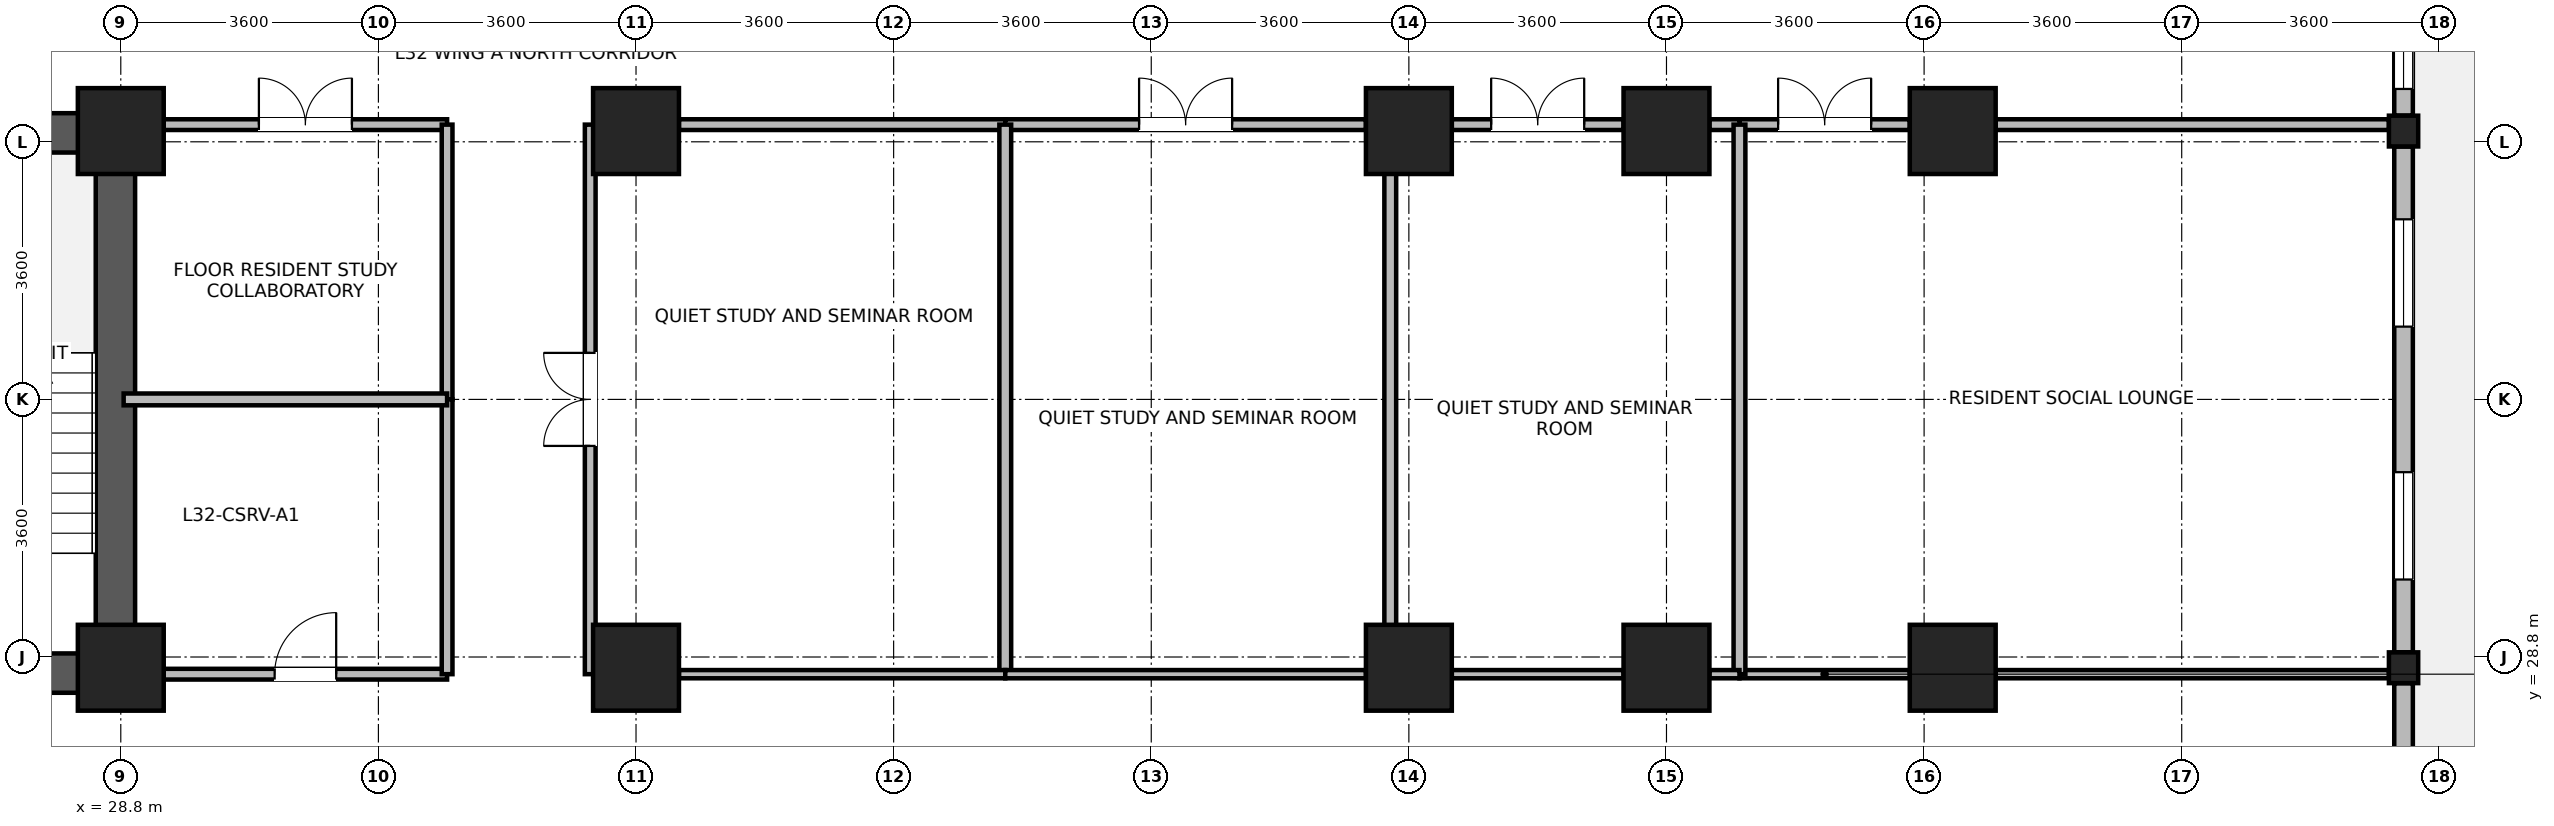
"""IFC4 building model, lengths in metres.
Left out: names, types, materials, properties, quantities, classifications, styles, units other than length and angle.
Written with IfcOpenShell. Run it as: python <this file> out.ifc"""

import sys

from ifc_helpers import new_model, si_unit, direction, frame, frame_2d, origin, origin_2d, place, context, subcontext, project, spatial, rectangle, i_section, extrude, source, transform, mapped, element, fill, save


model = new_model("IFC4")
c1 = context("Model", 3, precision=1e-05, world=origin(), true_north=direction((0.0, 1.0)))
c2 = subcontext(c1, "Body", "Model", "MODEL_VIEW")
j1 = project(units=[si_unit("LENGTHUNIT", "METRE"), si_unit("PLANEANGLEUNIT", "RADIAN")], contexts=[c1])
p1 = place(None, origin())
s1 = spatial("IfcSite", under=j1, at=p1, CompositionType="ELEMENT")
p2 = place(p1, origin())
s2 = spatial("IfcBuilding", under=s1, at=p2, CompositionType="ELEMENT")
p3 = place(p2, frame((0.0, 0.0, 126.7)))
s3 = spatial("IfcBuildingStorey", under=s2, at=p3, CompositionType="ELEMENT", Elevation=126.7)
p4 = place(p3, frame((28.725, 28.3, 0.0), z_axis=(0.0, 0.0, 1.0), x_axis=(0.0, 1.0, 0.0)))
e1 = element("IfcWall", 1, at=p4, inside=s3, PredefinedType="SHEAR", context=c2, shape_type="SweptSolid", body=[
    extrude(rectangle(XDim=8.1, YDim=0.55, at=frame_2d((4.05, 0.0))), origin(), (0.0, 0.0, 1.0), 3.34),
])
for number, where, z_axis, x_axis in (
    (2, (25.25, 28.575, 0.0), (0.0, 0.0, 1.0), (1.0, 0.0, 0.0)),
    (3, (25.25, 36.125, 0.0), (0.0, 0.0, 1.0), (1.0, 0.0, 0.0)),
):
    element("IfcWall", number, at=place(p3, frame(where, z_axis=z_axis, x_axis=x_axis)), inside=s3, PredefinedType="SHEAR", context=c2, shape_type="SweptSolid", body=[
        extrude(rectangle(XDim=3.2, YDim=0.55, at=frame_2d((1.6, 0.0))), origin(), (0.0, 0.0, 1.0), 3.34),
    ])
m1 = source(origin(), c2, "Body", "SweptSolid", [
    extrude(rectangle(XDim=1.2, YDim=1.2, at=origin_2d()), origin(), (0.0, 0.0, 1.0), 3.7),
])
for number, where, z_axis, x_axis in (
    (4, (28.8, 28.65, 0.0), (0.0, 0.0, 1.0), (1.0, 0.0, 0.0)),
    (5, (28.8, 36.15, 0.0), (0.0, 0.0, 1.0), (1.0, 0.0, 0.0)),
    (6, (36.0, 28.65, 0.0), (0.0, 0.0, 1.0), (1.0, 0.0, 0.0)),
    (7, (36.0, 36.15, 0.0), (0.0, 0.0, 1.0), (1.0, 0.0, 0.0)),
    (8, (46.8, 28.65, 0.0), (0.0, 0.0, 1.0), (1.0, 0.0, 0.0)),
    (9, (46.8, 36.15, 0.0), (0.0, 0.0, 1.0), (1.0, 0.0, 0.0)),
    (10, (50.4, 28.65, 0.0), (0.0, 0.0, 1.0), (1.0, 0.0, 0.0)),
    (11, (50.4, 36.15, 0.0), (0.0, 0.0, 1.0), (1.0, 0.0, 0.0)),
    (12, (54.4, 28.65, 0.0), (0.0, 0.0, 1.0), (1.0, 0.0, 0.0)),
    (13, (54.4, 36.15, 0.0), (0.0, 0.0, 1.0), (1.0, 0.0, 0.0)),
):
    element("IfcColumn", number, at=place(p3, frame(where, z_axis=z_axis, x_axis=x_axis)), inside=s3, PredefinedType="COLUMN", context=c2, shape_type="MappedRepresentation", body=[
        mapped(m1, transform((0.0, 0.0, 0.0), x_axis=(1.0, 0.0, 0.0), y_axis=(0.0, 1.0, 0.0), z_axis=(0.0, 0.0, 1.0), scale=1.0)),
    ])
m2 = source(origin(), c2, "Body", "SweptSolid", [
    extrude(i_section(OverallWidth=0.409, OverallDepth=0.43, WebThickness=0.024, FlangeThickness=0.033, FilletRadius=0.015, at=origin_2d()), origin(), (0.0, 0.0, 1.0), 3.7),
])
for number, where, z_axis, x_axis in (
    (14, (60.7, 28.65, 0.0), (0.0, 0.0, 1.0), (1.0, 0.0, 0.0)),
    (15, (60.7, 36.15, 0.0), (0.0, 0.0, 1.0), (1.0, 0.0, 0.0)),
):
    element("IfcColumn", number, at=place(p3, frame(where, z_axis=z_axis, x_axis=x_axis)), inside=s3, PredefinedType="COLUMN", context=c2, shape_type="MappedRepresentation", body=[
        mapped(m2, transform((0.0, 0.0, 0.0), x_axis=(1.0, 0.0, 0.0), y_axis=(0.0, 1.0, 0.0), z_axis=(0.0, 0.0, 1.0), scale=1.0)),
    ])
p5 = place(p3, frame((60.7, 28.434, 0.0), z_axis=(0.0, 0.0, 1.0), x_axis=(0.0, -1.0, 0.0)))
e16 = element("IfcWall", 16, at=p5, inside=s3, PredefinedType="STANDARD", context=c2, shape_type="SweptSolid", body=[
    extrude(rectangle(XDim=6.618, YDim=0.26, at=frame_2d((3.309, 0.0))), origin(), (0.0, 0.0, 1.0), 2.87),
])
p6 = place(p5, frame((4.213, 0.0, 0.85)))
e17 = element("IfcOpeningElement", 17, at=p6, cuts=e16, PredefinedType="OPENING", context=c2, shape_type="SweptSolid", body=[
    extrude(rectangle(XDim=1.5, YDim=1.85, at=frame_2d((0.75, 0.925))), frame((0.0, 0.14, 0.0), z_axis=(0.0, -1.0, 0.0), x_axis=(1.0, 0.0, 0.0)), (0.0, 0.0, 1.0), 0.28),
])
p7 = place(p5, frame((2.834, 0.0, 0.85)))
e18 = element("IfcOpeningElement", 18, at=p7, cuts=e16, PredefinedType="OPENING", context=c2, shape_type="SweptSolid", body=[
    extrude(rectangle(XDim=0.95, YDim=1.75, at=frame_2d((0.475, 0.875))), frame((0.0, 0.14, 0.0), z_axis=(0.0, -1.0, 0.0), x_axis=(1.0, 0.0, 0.0)), (0.0, 0.0, 1.0), 0.28),
])
p8 = place(p3, frame((60.7, 35.934, 0.0), z_axis=(0.0, 0.0, 1.0), x_axis=(0.0, -1.0, 0.0)))
e19 = element("IfcWall", 19, at=p8, inside=s3, PredefinedType="STANDARD", context=c2, shape_type="SweptSolid", body=[
    extrude(rectangle(XDim=7.068, YDim=0.26, at=frame_2d((3.534, 0.0))), origin(), (0.0, 0.0, 1.0), 2.87),
])
p9 = place(p8, frame((1.017, 0.0, 0.85)))
e20 = element("IfcOpeningElement", 20, at=p9, cuts=e19, PredefinedType="OPENING", context=c2, shape_type="SweptSolid", body=[
    extrude(rectangle(XDim=1.5, YDim=1.85, at=frame_2d((0.75, 0.925))), frame((0.0, 0.14, 0.0), z_axis=(0.0, -1.0, 0.0), x_axis=(1.0, 0.0, 0.0)), (0.0, 0.0, 1.0), 0.28),
])
p10 = place(p8, frame((4.551, 0.0, 0.85)))
e21 = element("IfcOpeningElement", 21, at=p10, cuts=e19, PredefinedType="OPENING", context=c2, shape_type="SweptSolid", body=[
    extrude(rectangle(XDim=1.5, YDim=1.85, at=frame_2d((0.75, 0.925))), frame((0.0, 0.14, 0.0), z_axis=(0.0, -1.0, 0.0), x_axis=(1.0, 0.0, 0.0)), (0.0, 0.0, 1.0), 0.28),
])
p11 = place(p3, frame((60.7, 39.73, 0.0), z_axis=(0.0, 0.0, 1.0), x_axis=(0.0, -1.0, 0.0)))
e22 = element("IfcWall", 22, at=p11, inside=s3, PredefinedType="STANDARD", context=c2, shape_type="SweptSolid", body=[
    extrude(rectangle(XDim=3.364, YDim=0.26, at=frame_2d((1.682, 0.0))), origin(), (0.0, 0.0, 1.0), 3.32),
])
p12 = place(p11, frame((2.041, 0.0, 0.85)))
e23 = element("IfcOpeningElement", 23, at=p12, cuts=e22, PredefinedType="OPENING", context=c2, shape_type="SweptSolid", body=[
    extrude(rectangle(XDim=0.95, YDim=1.75, at=frame_2d((0.475, 0.875))), frame((0.0, 0.14, 0.0), z_axis=(0.0, -1.0, 0.0), x_axis=(1.0, 0.0, 0.0)), (0.0, 0.0, 1.0), 0.28),
])
p13 = place(p11, frame((0.265, 0.0, 0.85)))
e24 = element("IfcOpeningElement", 24, at=p13, cuts=e22, PredefinedType="OPENING", context=c2, shape_type="SweptSolid", body=[
    extrude(rectangle(XDim=0.95, YDim=1.75, at=frame_2d((0.475, 0.875))), frame((0.0, 0.14, 0.0), z_axis=(0.0, -1.0, 0.0), x_axis=(1.0, 0.0, 0.0)), (0.0, 0.0, 1.0), 0.28),
])
p14 = place(p3, frame((51.42, 36.24, 0.0), z_axis=(0.0, 0.0, 1.0), x_axis=(1.0, 0.0, 0.0)))
e25 = element("IfcWall", 25, at=p14, inside=s3, PredefinedType="PARTITIONING", context=c2, shape_type="SweptSolid", body=[
    extrude(rectangle(XDim=2.38, YDim=0.15, at=frame_2d((1.19, 0.0))), origin(), (0.0, 0.0, 1.0), 2.67),
])
p15 = place(p14, frame((0.54, 0.0, 0.0)))
e26 = element("IfcOpeningElement", 26, at=p15, cuts=e25, PredefinedType="OPENING", context=c2, shape_type="SweptSolid", body=[
    extrude(rectangle(XDim=1.3, YDim=2.12, at=frame_2d((0.65, 1.06))), frame((0.0, 0.085, 0.0), z_axis=(0.0, -1.0, 0.0), x_axis=(1.0, 0.0, 0.0)), (0.0, 0.0, 1.0), 0.17),
])
p16 = place(p3, frame((55.0, 36.24, 0.0), z_axis=(0.0, 0.0, 1.0), x_axis=(1.0, 0.0, 0.0)))
e27 = element("IfcWall", 27, at=p16, inside=s3, PredefinedType="PARTITIONING", context=c2, shape_type="SweptSolid", body=[
    extrude(rectangle(XDim=5.496, YDim=0.15, at=frame_2d((2.748, 0.0))), origin(), (0.0, 0.0, 1.0), 2.67),
])
p17 = place(p3, frame((35.36, 28.56, 0.0), z_axis=(0.0, 0.0, 1.0), x_axis=(0.0, 1.0, 0.0)))
e28 = element("IfcWall", 28, at=p17, inside=s3, PredefinedType="PARTITIONING", context=c2, shape_type="SweptSolid", body=[
    extrude(rectangle(XDim=7.68, YDim=0.15, at=frame_2d((3.84, 0.0))), origin(), (0.0, 0.0, 1.0), 3.32),
])
p18 = place(p17, frame((3.19, 0.0, 0.0)))
e29 = element("IfcOpeningElement", 29, at=p18, cuts=e28, PredefinedType="OPENING", context=c2, shape_type="SweptSolid", body=[
    extrude(rectangle(XDim=1.3, YDim=2.12, at=frame_2d((0.65, 1.06))), frame((0.0, 0.085, 0.0), z_axis=(0.0, -1.0, 0.0), x_axis=(1.0, 0.0, 0.0)), (0.0, 0.0, 1.0), 0.17),
])
p19 = place(p3, frame((36.6, 36.24, 0.0), z_axis=(0.0, 0.0, 1.0), x_axis=(1.0, 0.0, 0.0)))
e30 = element("IfcWall", 30, at=p19, inside=s3, PredefinedType="PARTITIONING", context=c2, shape_type="SweptSolid", body=[
    extrude(rectangle(XDim=4.56, YDim=0.15, at=frame_2d((2.28, 0.0))), origin(), (0.0, 0.0, 1.0), 2.67),
])
p20 = place(p3, frame((41.16, 36.24, 0.0), z_axis=(0.0, 0.0, 1.0), x_axis=(1.0, 0.0, 0.0)))
e31 = element("IfcWall", 31, at=p20, inside=s3, PredefinedType="PARTITIONING", context=c2, shape_type="SweptSolid", body=[
    extrude(rectangle(XDim=5.04, YDim=0.15, at=frame_2d((2.52, 0.0))), origin(), (0.0, 0.0, 1.0), 2.67),
])
p21 = place(p20, frame((1.87, 0.0, 0.0)))
e32 = element("IfcOpeningElement", 32, at=p21, cuts=e31, PredefinedType="OPENING", context=c2, shape_type="SweptSolid", body=[
    extrude(rectangle(XDim=1.3, YDim=2.12, at=frame_2d((0.65, 1.06))), frame((0.0, 0.085, 0.0), z_axis=(0.0, -1.0, 0.0), x_axis=(1.0, 0.0, 0.0)), (0.0, 0.0, 1.0), 0.17),
])
p22 = place(p3, frame((47.4, 36.24, 0.0), z_axis=(0.0, 0.0, 1.0), x_axis=(1.0, 0.0, 0.0)))
e33 = element("IfcWall", 33, at=p22, inside=s3, PredefinedType="PARTITIONING", context=c2, shape_type="SweptSolid", body=[
    extrude(rectangle(XDim=2.4, YDim=0.15, at=frame_2d((1.2, 0.0))), origin(), (0.0, 0.0, 1.0), 2.67),
])
p23 = place(p22, frame((0.55, 0.0, 0.0)))
e34 = element("IfcOpeningElement", 34, at=p23, cuts=e33, PredefinedType="OPENING", context=c2, shape_type="SweptSolid", body=[
    extrude(rectangle(XDim=1.3, YDim=2.12, at=frame_2d((0.65, 1.06))), frame((0.0, 0.085, 0.0), z_axis=(0.0, -1.0, 0.0), x_axis=(1.0, 0.0, 0.0)), (0.0, 0.0, 1.0), 0.17),
])
p24 = place(p3, frame((51.0, 36.24, 0.0), z_axis=(0.0, 0.0, 1.0), x_axis=(1.0, 0.0, 0.0)))
e35 = element("IfcWall", 35, at=p24, inside=s3, PredefinedType="PARTITIONING", context=c2, shape_type="SweptSolid", body=[
    extrude(rectangle(XDim=0.42, YDim=0.15, at=frame_2d((0.21, 0.0))), origin(), (0.0, 0.0, 1.0), 2.67),
])
p25 = place(p3, frame((29.4, 28.56, 0.0), z_axis=(0.0, 0.0, 1.0), x_axis=(1.0, 0.0, 0.0)))
e36 = element("IfcWall", 36, at=p25, inside=s3, PredefinedType="PARTITIONING", context=c2, shape_type="SweptSolid", body=[
    extrude(rectangle(XDim=3.96, YDim=0.15, at=frame_2d((1.98, 0.0))), origin(), (0.0, 0.0, 1.0), 2.67),
])
p26 = place(p25, frame((1.55, 0.0, 0.0)))
e37 = element("IfcOpeningElement", 37, at=p26, cuts=e36, PredefinedType="OPENING", context=c2, shape_type="SweptSolid", body=[
    extrude(rectangle(XDim=0.86, YDim=2.02, at=frame_2d((0.43, 1.01))), frame((0.0, 0.085, 0.0), z_axis=(0.0, -1.0, 0.0), x_axis=(1.0, 0.0, 0.0)), (0.0, 0.0, 1.0), 0.17),
])
p27 = place(p3, frame((29.4, 36.24, 0.0), z_axis=(0.0, 0.0, 1.0), x_axis=(1.0, 0.0, 0.0)))
e38 = element("IfcWall", 38, at=p27, inside=s3, PredefinedType="PARTITIONING", context=c2, shape_type="SweptSolid", body=[
    extrude(rectangle(XDim=3.96, YDim=0.15, at=frame_2d((1.98, 0.0))), origin(), (0.0, 0.0, 1.0), 2.67),
])
p28 = place(p27, frame((1.33, 0.0, 0.0)))
e39 = element("IfcOpeningElement", 39, at=p28, cuts=e38, PredefinedType="OPENING", context=c2, shape_type="SweptSolid", body=[
    extrude(rectangle(XDim=1.3, YDim=2.12, at=frame_2d((0.65, 1.06))), frame((0.0, 0.085, 0.0), z_axis=(0.0, -1.0, 0.0), x_axis=(1.0, 0.0, 0.0)), (0.0, 0.0, 1.0), 0.17),
])
p29 = place(p3, frame((33.36, 32.4, 0.0), z_axis=(0.0, 0.0, 1.0), x_axis=(0.0, 1.0, 0.0)))
e40 = element("IfcWall", 40, at=p29, inside=s3, PredefinedType="PARTITIONING", context=c2, shape_type="SweptSolid", body=[
    extrude(rectangle(XDim=3.84, YDim=0.15, at=frame_2d((1.92, 0.0))), origin(), (0.0, 0.0, 1.0), 3.32),
])
p30 = place(p3, frame((33.36, 28.56, 0.0), z_axis=(0.0, 0.0, 1.0), x_axis=(0.0, 1.0, 0.0)))
e41 = element("IfcWall", 41, at=p30, inside=s3, PredefinedType="PARTITIONING", context=c2, shape_type="SweptSolid", body=[
    extrude(rectangle(XDim=3.84, YDim=0.15, at=frame_2d((1.92, 0.0))), origin(), (0.0, 0.0, 1.0), 3.32),
])
p31 = place(p3, frame((51.42, 28.56, 0.0), z_axis=(0.0, 0.0, 1.0), x_axis=(1.0, 0.0, 0.0)))
e42 = element("IfcWall", 42, at=p31, inside=s3, PredefinedType="PARTITIONING", context=c2, shape_type="SweptSolid", body=[
    extrude(rectangle(XDim=2.38, YDim=0.115, at=frame_2d((1.19, 0.0))), origin(), (0.0, 0.0, 1.0), 2.67),
])
p32 = place(p3, frame((55.0, 28.56, 0.0), z_axis=(0.0, 0.0, 1.0), x_axis=(1.0, 0.0, 0.0)))
e43 = element("IfcWall", 43, at=p32, inside=s3, PredefinedType="PARTITIONING", context=c2, shape_type="SweptSolid", body=[
    extrude(rectangle(XDim=5.496, YDim=0.115, at=frame_2d((2.748, 0.0))), origin(), (0.0, 0.0, 1.0), 2.67),
])
for number, where, z_axis, x_axis in (
    (44, (41.16, 28.56, 0.0), (0.0, 0.0, 1.0), (0.0, 1.0, 0.0)),
    (45, (46.54, 28.56, 0.0), (0.0, 0.0, 1.0), (0.0, 1.0, 0.0)),
    (46, (51.42, 28.56, 0.0), (0.0, 0.0, 1.0), (0.0, 1.0, 0.0)),
):
    element("IfcWall", number, at=place(p3, frame(where, z_axis=z_axis, x_axis=x_axis)), inside=s3, PredefinedType="PARTITIONING", context=c2, shape_type="SweptSolid", body=[
        extrude(rectangle(XDim=7.68, YDim=0.165, at=frame_2d((3.84, 0.0))), origin(), (0.0, 0.0, 1.0), 3.32),
    ])
p33 = place(p3, frame((36.6, 28.56, 0.0), z_axis=(0.0, 0.0, 1.0), x_axis=(1.0, 0.0, 0.0)))
e47 = element("IfcWall", 47, at=p33, inside=s3, PredefinedType="PARTITIONING", context=c2, shape_type="SweptSolid", body=[
    extrude(rectangle(XDim=4.56, YDim=0.115, at=frame_2d((2.28, 0.0))), origin(), (0.0, 0.0, 1.0), 2.67),
])
p34 = place(p3, frame((41.16, 28.56, 0.0), z_axis=(0.0, 0.0, 1.0), x_axis=(1.0, 0.0, 0.0)))
e48 = element("IfcWall", 48, at=p34, inside=s3, PredefinedType="PARTITIONING", context=c2, shape_type="SweptSolid", body=[
    extrude(rectangle(XDim=5.04, YDim=0.115, at=frame_2d((2.52, 0.0))), origin(), (0.0, 0.0, 1.0), 2.67),
])
p35 = place(p3, frame((47.4, 28.56, 0.0), z_axis=(0.0, 0.0, 1.0), x_axis=(1.0, 0.0, 0.0)))
e49 = element("IfcWall", 49, at=p35, inside=s3, PredefinedType="PARTITIONING", context=c2, shape_type="SweptSolid", body=[
    extrude(rectangle(XDim=2.4, YDim=0.115, at=frame_2d((1.2, 0.0))), origin(), (0.0, 0.0, 1.0), 2.67),
])
p36 = place(p3, frame((51.0, 28.56, 0.0), z_axis=(0.0, 0.0, 1.0), x_axis=(1.0, 0.0, 0.0)))
e50 = element("IfcWall", 50, at=p36, inside=s3, PredefinedType="PARTITIONING", context=c2, shape_type="SweptSolid", body=[
    extrude(rectangle(XDim=0.42, YDim=0.115, at=frame_2d((0.21, 0.0))), origin(), (0.0, 0.0, 1.0), 2.67),
])
p37 = place(p3, frame((28.84, 32.4, 0.0), z_axis=(0.0, 0.0, 1.0), x_axis=(1.0, 0.0, 0.0)))
e51 = element("IfcWall", 51, at=p37, inside=s3, PredefinedType="PARTITIONING", context=c2, shape_type="SweptSolid", body=[
    extrude(rectangle(XDim=4.52, YDim=0.165, at=frame_2d((2.26, 0.0))), origin(), (0.0, 0.0, 1.0), 3.32),
])
p38 = place(p9, origin())
e52 = element("IfcWindow", 52, at=p38, inside=s3, PartitioningType="SINGLE_PANEL", PredefinedType="WINDOW", context=c2, shape_type="SweptSolid", body=[
    extrude(rectangle(XDim=1.5, YDim=1.85, at=frame_2d((0.75, 0.925))), frame((0.0, 0.03, 0.0), z_axis=(0.0, -1.0, 0.0), x_axis=(1.0, 0.0, 0.0)), (0.0, 0.0, 1.0), 0.06),
])
fill(e20, e52)
p39 = place(p10, origin())
e53 = element("IfcWindow", 53, at=p39, inside=s3, PartitioningType="SINGLE_PANEL", PredefinedType="WINDOW", context=c2, shape_type="SweptSolid", body=[
    extrude(rectangle(XDim=1.5, YDim=1.85, at=frame_2d((0.75, 0.925))), frame((0.0, 0.03, 0.0), z_axis=(0.0, -1.0, 0.0), x_axis=(1.0, 0.0, 0.0)), (0.0, 0.0, 1.0), 0.06),
])
fill(e21, e53)
p40 = place(p12, origin())
e54 = element("IfcWindow", 54, at=p40, inside=s3, PartitioningType="SINGLE_PANEL", PredefinedType="WINDOW", context=c2, shape_type="SweptSolid", body=[
    extrude(rectangle(XDim=0.95, YDim=1.75, at=frame_2d((0.475, 0.875))), frame((0.0, 0.03, 0.0), z_axis=(0.0, -1.0, 0.0), x_axis=(1.0, 0.0, 0.0)), (0.0, 0.0, 1.0), 0.06),
])
fill(e23, e54)
p41 = place(p15, origin())
e55 = element("IfcDoor", 55, at=p41, inside=s3, OperationType="DOUBLE_DOOR_SINGLE_SWING", PredefinedType="DOOR", context=c2, shape_type="SweptSolid", body=[
    extrude(rectangle(XDim=1.3, YDim=2.12, at=frame_2d((0.65, 1.06))), frame((0.0, 0.025, 0.0), z_axis=(0.0, -1.0, 0.0), x_axis=(1.0, 0.0, 0.0)), (0.0, 0.0, 1.0), 0.05),
])
fill(e26, e55)
p42 = place(p18, origin())
e56 = element("IfcDoor", 56, at=p42, inside=s3, OperationType="DOUBLE_DOOR_SINGLE_SWING", PredefinedType="DOOR", context=c2, shape_type="SweptSolid", body=[
    extrude(rectangle(XDim=1.3, YDim=2.12, at=frame_2d((0.65, 1.06))), frame((0.0, 0.025, 0.0), z_axis=(0.0, -1.0, 0.0), x_axis=(1.0, 0.0, 0.0)), (0.0, 0.0, 1.0), 0.05),
])
fill(e29, e56)
p43 = place(p21, origin())
e57 = element("IfcDoor", 57, at=p43, inside=s3, OperationType="DOUBLE_DOOR_SINGLE_SWING", PredefinedType="DOOR", context=c2, shape_type="SweptSolid", body=[
    extrude(rectangle(XDim=1.3, YDim=2.12, at=frame_2d((0.65, 1.06))), frame((0.0, 0.025, 0.0), z_axis=(0.0, -1.0, 0.0), x_axis=(1.0, 0.0, 0.0)), (0.0, 0.0, 1.0), 0.05),
])
fill(e32, e57)
p44 = place(p23, origin())
e58 = element("IfcDoor", 58, at=p44, inside=s3, OperationType="DOUBLE_DOOR_SINGLE_SWING", PredefinedType="DOOR", context=c2, shape_type="SweptSolid", body=[
    extrude(rectangle(XDim=1.3, YDim=2.12, at=frame_2d((0.65, 1.06))), frame((0.0, 0.025, 0.0), z_axis=(0.0, -1.0, 0.0), x_axis=(1.0, 0.0, 0.0)), (0.0, 0.0, 1.0), 0.05),
])
fill(e34, e58)
p45 = place(p26, origin())
e59 = element("IfcDoor", 59, at=p45, inside=s3, OperationType="SINGLE_SWING_RIGHT", PredefinedType="DOOR", context=c2, shape_type="SweptSolid", body=[
    extrude(rectangle(XDim=0.86, YDim=2.02, at=frame_2d((0.43, 1.01))), frame((0.0, 0.025, 0.0), z_axis=(0.0, -1.0, 0.0), x_axis=(1.0, 0.0, 0.0)), (0.0, 0.0, 1.0), 0.05),
])
fill(e37, e59)
p46 = place(p28, origin())
e60 = element("IfcDoor", 60, at=p46, inside=s3, OperationType="DOUBLE_DOOR_SINGLE_SWING", PredefinedType="DOOR", context=c2, shape_type="SweptSolid", body=[
    extrude(rectangle(XDim=1.3, YDim=2.12, at=frame_2d((0.65, 1.06))), frame((0.0, 0.025, 0.0), z_axis=(0.0, -1.0, 0.0), x_axis=(1.0, 0.0, 0.0)), (0.0, 0.0, 1.0), 0.05),
])
fill(e39, e60)
save(model, sys.argv[1])
